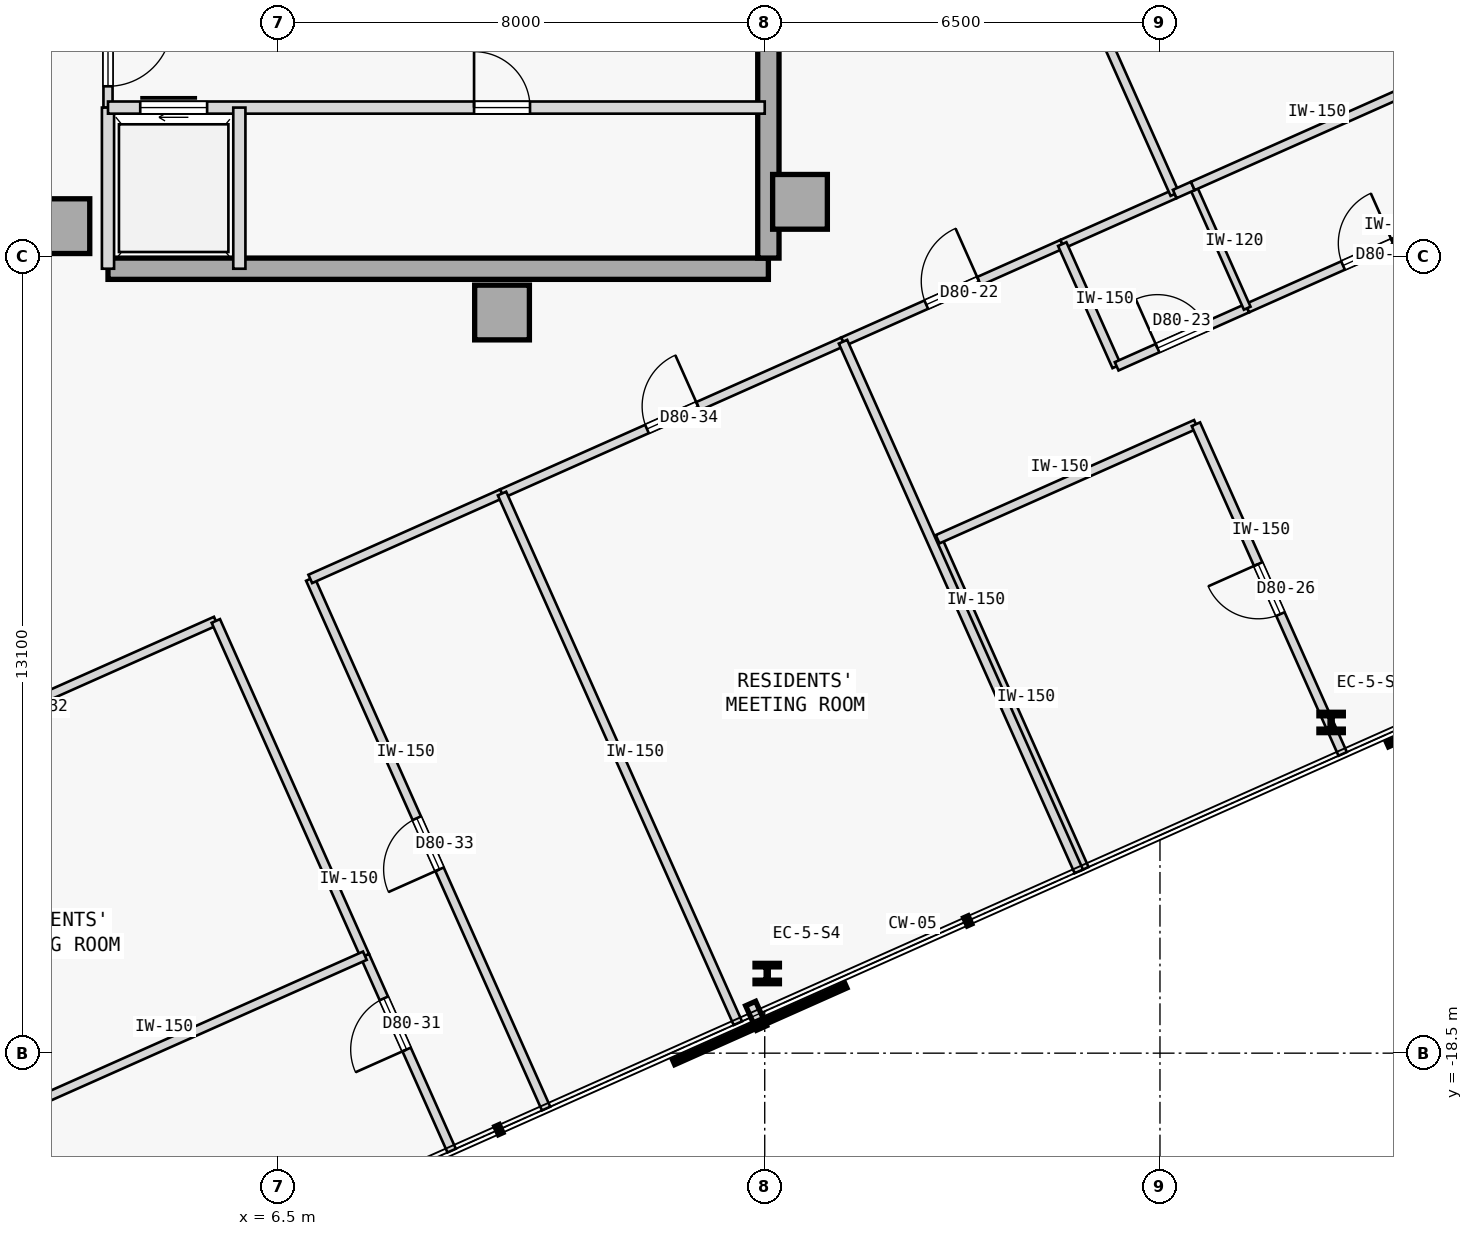
"""IFC4 building model, lengths in metres.
Left out: names, types, materials, properties, quantities, classifications, styles, units other than length and angle.
Written with IfcOpenShell. Run it as: python <this file> out.ifc"""

import sys

from ifc_helpers import new_model, si_unit, direction, frame, frame_2d, origin, origin_2d, place, context, subcontext, project, spatial, rectangle, i_section, extrude, element, fill, save


model = new_model("IFC4")
c1 = context("Model", 3, precision=1e-05, world=origin(), true_north=direction((0.0, 1.0)))
c2 = subcontext(c1, "Body", "Model", "MODEL_VIEW")
j1 = project(units=[si_unit("LENGTHUNIT", "METRE"), si_unit("PLANEANGLEUNIT", "RADIAN")], contexts=[c1])
p1 = place(None, origin())
s1 = spatial("IfcSite", under=j1, at=p1, CompositionType="ELEMENT")
p2 = place(p1, origin())
s2 = spatial("IfcBuilding", under=s1, at=p2, CompositionType="ELEMENT")
p3 = place(p2, frame((0.0, 0.0, 298.65)))
s3 = spatial("IfcBuildingStorey", under=s2, at=p3, CompositionType="ELEMENT", Elevation=298.65)
for number, where, z_axis, x_axis in (
    (1, (15.08, -4.5, 0.0), (0.0, 0.0, 1.0), (1.0, 0.0, 0.0)),
    (2, (10.18, -6.32, 0.0), (0.0, 0.0, 1.0), (1.0, 0.0, 0.0)),
    (3, (2.95, -4.9, 0.0), (0.0, 0.0, 1.0), (1.0, 0.0, 0.0)),
):
    element("IfcColumn", number, at=place(p3, frame(where, z_axis=z_axis, x_axis=x_axis)), inside=s3, PredefinedType="COLUMN", context=c2, shape_type="SweptSolid", body=[
        extrude(rectangle(XDim=0.9, YDim=0.9, at=origin_2d()), origin(), (0.0, 0.0, 1.0), 3.35),
    ])
p4 = place(p3, frame((3.7, -5.6, 0.0), z_axis=(0.0, 0.0, 1.0), x_axis=(1.0, 0.0, 0.0)))
e4 = element("IfcWall", 4, at=p4, inside=s3, PredefinedType="SHEAR", context=c2, shape_type="SweptSolid", body=[
    extrude(rectangle(XDim=10.86, YDim=0.35, at=frame_2d((5.43, 0.0))), origin(), (0.0, 0.0, 1.0), 3.125),
])
p5 = place(p3, frame((14.56, -5.425, 0.0), z_axis=(0.0, 0.0, 1.0), x_axis=(0.0, 1.0, 0.0)))
e5 = element("IfcWall", 5, at=p5, inside=s3, PredefinedType="SHEAR", context=c2, shape_type="SweptSolid", body=[
    extrude(rectangle(XDim=10.85, YDim=0.35, at=frame_2d((5.425, 0.0))), origin(), (0.0, 0.0, 1.0), 3.125),
])
for number, where, z_axis, x_axis in (
    (6, (14.541, -17.19, 0.0), (0.0, 0.0, 1.0), (1.0, 0.0, 0.0)),
    (7, (23.814, -13.062, 0.0), (0.0, 0.0, 1.0), (1.0, 0.0, 0.0)),
):
    element("IfcColumn", number, at=place(p3, frame(where, z_axis=z_axis, x_axis=x_axis)), inside=s3, PredefinedType="COLUMN", context=c2, shape_type="SweptSolid", body=[
        extrude(i_section(OverallWidth=0.401, OverallDepth=0.335, WebThickness=0.036, FlangeThickness=0.058, FilletRadius=0.015, at=origin_2d()), origin(), (0.0, 0.0, 1.0), 3.35),
    ])
p6 = place(p3, frame((3.7, -2.95, 0.0), z_axis=(0.0, 0.0, 1.0), x_axis=(0.0, 1.0, 0.0)))
e8 = element("IfcWall", 8, at=p6, inside=s3, PredefinedType="PARTITIONING", context=c2, shape_type="SweptSolid", body=[
    extrude(rectangle(XDim=1.8, YDim=0.15, at=frame_2d((0.9, 0.0))), origin(), (0.0, 0.0, 1.0), 3.125),
])
p7 = place(p6, frame((0.35, 0.0, 0.0)))
e9 = element("IfcOpeningElement", 9, at=p7, cuts=e8, PredefinedType="OPENING", context=c2, shape_type="SweptSolid", body=[
    extrude(rectangle(XDim=1.05, YDim=2.18, at=frame_2d((0.525, 1.09))), frame((0.0, 0.085, 0.0), z_axis=(0.0, -1.0, 0.0), x_axis=(1.0, 0.0, 0.0)), (0.0, 0.0, 1.0), 0.17),
])
p8 = place(p3, frame((3.7, -5.6, 0.0), z_axis=(0.0, 0.0, 1.0), x_axis=(0.0, 1.0, 0.0)))
e10 = element("IfcWall", 10, at=p8, inside=s3, PredefinedType="STANDARD", context=c2, shape_type="SweptSolid", body=[
    extrude(rectangle(XDim=2.65, YDim=0.2, at=frame_2d((1.325, 0.0))), origin(), (0.0, 0.0, 1.0), 3.125),
])
p9 = place(p3, frame((3.7, -2.95, 0.0), z_axis=(0.0, 0.0, 1.0), x_axis=(1.0, 0.0, 0.0)))
e11 = element("IfcWall", 11, at=p9, inside=s3, PredefinedType="STANDARD", context=c2, shape_type="SweptSolid", body=[
    extrude(rectangle(XDim=10.8, YDim=0.2, at=frame_2d((5.4, 0.0))), origin(), (0.0, 0.0, 1.0), 3.125),
])
p10 = place(p9, frame((0.53, 0.0, 0.0)))
e12 = element("IfcOpeningElement", 12, at=p10, cuts=e11, PredefinedType="OPENING", context=c2, shape_type="SweptSolid", body=[
    extrude(rectangle(XDim=1.1, YDim=2.15, at=frame_2d((0.55, 1.075))), frame((0.0, 0.11, 0.0), z_axis=(0.0, -1.0, 0.0), x_axis=(1.0, 0.0, 0.0)), (0.0, 0.0, 1.0), 0.22),
])
p11 = place(p9, frame((6.02, 0.0, 0.0)))
e13 = element("IfcOpeningElement", 13, at=p11, cuts=e11, PredefinedType="OPENING", context=c2, shape_type="SweptSolid", body=[
    extrude(rectangle(XDim=0.92, YDim=2.15, at=frame_2d((0.46, 1.075))), frame((0.0, 0.11, 0.0), z_axis=(0.0, -1.0, 0.0), x_axis=(1.0, 0.0, 0.0)), (0.0, 0.0, 1.0), 0.22),
])
p12 = place(p3, frame((5.86, -5.6, 0.0), z_axis=(0.0, 0.0, 1.0), x_axis=(0.0, 1.0, 0.0)))
e14 = element("IfcWall", 14, at=p12, inside=s3, PredefinedType="STANDARD", context=c2, shape_type="SweptSolid", body=[
    extrude(rectangle(XDim=2.65, YDim=0.2, at=frame_2d((1.325, 0.0))), origin(), (0.0, 0.0, 1.0), 3.125),
])
p13 = place(p3, frame((15.787, -6.8, 0.0), z_axis=(0.0, 0.0, 1.0), x_axis=(0.913558844356, 0.406706574693, 0.0)))
e15 = element("IfcWall", 15, at=p13, inside=s3, PredefinedType="PARTITIONING", context=c2, shape_type="SweptSolid", body=[
    extrude(rectangle(XDim=3.947, YDim=0.15, at=frame_2d((1.973, 0.0))), origin(), (0.0, 0.0, 1.0), 3.125),
])
p14 = place(p13, frame((1.499, 0.0, 0.0)))
e16 = element("IfcOpeningElement", 16, at=p14, cuts=e15, PredefinedType="OPENING", context=c2, shape_type="SweptSolid", body=[
    extrude(rectangle(XDim=0.95, YDim=2.15, at=frame_2d((0.475, 1.075))), frame((0.0, 0.085, 0.0), z_axis=(0.0, -1.0, 0.0), x_axis=(1.0, 0.0, 0.0)), (0.0, 0.0, 1.0), 0.17),
])
p15 = place(p3, frame((19.393, -5.195, 0.0), z_axis=(0.0, 0.0, 1.0), x_axis=(0.91354290336, 0.406742380039, 0.0)))
e17 = element("IfcWall", 17, at=p15, inside=s3, PredefinedType="PARTITIONING", context=c2, shape_type="SweptSolid", body=[
    extrude(rectangle(XDim=2.025, YDim=0.15, at=frame_2d((1.013, 0.0))), origin(), (0.0, 0.0, 1.0), 3.125),
])
p16 = place(p3, frame((9.352, -20.103, 0.0), z_axis=(0.0, 0.0, 1.0), x_axis=(-0.406745199814, 0.913541647889, 0.0)))
e18 = element("IfcWall", 18, at=p16, inside=s3, PredefinedType="PARTITIONING", context=c2, shape_type="SweptSolid", body=[
    extrude(rectangle(XDim=3.509, YDim=0.15, at=frame_2d((1.754, 0.0))), origin(), (0.0, 0.0, 1.0), 3.125),
])
p17 = place(p16, frame((1.821, 0.0, 0.0)))
e19 = element("IfcOpeningElement", 19, at=p17, cuts=e18, PredefinedType="OPENING", context=c2, shape_type="SweptSolid", body=[
    extrude(rectangle(XDim=0.92, YDim=2.15, at=frame_2d((0.46, 1.075))), frame((0.0, 0.085, 0.0), z_axis=(0.0, -1.0, 0.0), x_axis=(1.0, 0.0, 0.0)), (0.0, 0.0, 1.0), 0.17),
])
p18 = place(p3, frame((-0.903, -14.231, 0.0), z_axis=(0.0, 0.0, 1.0), x_axis=(0.913538735702, 0.406751740466, 0.0)))
e20 = element("IfcWall", 20, at=p18, inside=s3, PredefinedType="PARTITIONING", context=c2, shape_type="SweptSolid", body=[
    extrude(rectangle(XDim=6.98, YDim=0.15, at=frame_2d((3.49, 0.0))), origin(), (0.0, 0.0, 1.0), 3.125),
])
p19 = place(p18, frame((3.03, 0.0, 0.0)))
e21 = element("IfcOpeningElement", 21, at=p19, cuts=e20, PredefinedType="OPENING", context=c2, shape_type="SweptSolid", body=[
    extrude(rectangle(XDim=0.92, YDim=2.15, at=frame_2d((0.46, 1.075))), frame((0.0, 0.085, 0.0), z_axis=(0.0, -1.0, 0.0), x_axis=(1.0, 0.0, 0.0)), (0.0, 0.0, 1.0), 0.17),
])
p20 = place(p3, frame((7.924, -16.897, 0.0), z_axis=(0.0, 0.0, 1.0), x_axis=(-0.406754846047, 0.91353735294, 0.0)))
e22 = element("IfcWall", 22, at=p20, inside=s3, PredefinedType="PARTITIONING", context=c2, shape_type="SweptSolid", body=[
    extrude(rectangle(XDim=6.026, YDim=0.15, at=frame_2d((3.013, 0.0))), origin(), (0.0, 0.0, 1.0), 3.125),
])
p21 = place(p3, frame((10.905, -19.412, 0.0), z_axis=(0.0, 0.0, 1.0), x_axis=(-0.406729927653, 0.913548447512, 0.0)))
e23 = element("IfcWall", 23, at=p21, inside=s3, PredefinedType="PARTITIONING", context=c2, shape_type="SweptSolid", body=[
    extrude(rectangle(XDim=9.535, YDim=0.15, at=frame_2d((4.768, 0.0))), origin(), (0.0, 0.0, 1.0), 3.125),
])
p22 = place(p21, frame((4.308, 0.0, 0.0)))
e24 = element("IfcOpeningElement", 24, at=p22, cuts=e23, PredefinedType="OPENING", context=c2, shape_type="SweptSolid", body=[
    extrude(rectangle(XDim=0.92, YDim=2.15, at=frame_2d((0.46, 1.075))), frame((0.0, 0.085, 0.0), z_axis=(0.0, -1.0, 0.0), x_axis=(1.0, 0.0, 0.0)), (0.0, 0.0, 1.0), 0.17),
])
p23 = place(p3, frame((7.026, -10.701, 0.0), z_axis=(0.0, 0.0, 1.0), x_axis=(0.913534253733, 0.406761806536, 0.0)))
e25 = element("IfcWall", 25, at=p23, inside=s3, PredefinedType="PARTITIONING", context=c2, shape_type="SweptSolid", body=[
    extrude(rectangle(XDim=3.452, YDim=0.15, at=frame_2d((1.726, 0.0))), origin(), (0.0, 0.0, 1.0), 3.125),
])
p24 = place(p3, frame((10.18, -9.297, 0.0), z_axis=(0.0, 0.0, 1.0), x_axis=(0.913545641557, 0.406736229997, 0.0)))
e26 = element("IfcWall", 26, at=p24, inside=s3, PredefinedType="PARTITIONING", context=c2, shape_type="SweptSolid", body=[
    extrude(rectangle(XDim=6.138, YDim=0.15, at=frame_2d((3.069, 0.0))), origin(), (0.0, 0.0, 1.0), 3.125),
])
p25 = place(p24, frame((2.609, 0.0, 0.0)))
e27 = element("IfcOpeningElement", 27, at=p25, cuts=e26, PredefinedType="OPENING", context=c2, shape_type="SweptSolid", body=[
    extrude(rectangle(XDim=0.92, YDim=2.15, at=frame_2d((0.46, 1.075))), frame((0.0, 0.085, 0.0), z_axis=(0.0, -1.0, 0.0), x_axis=(1.0, 0.0, 0.0)), (0.0, 0.0, 1.0), 0.17),
])
p26 = place(p3, frame((21.243, -4.371, 0.0), z_axis=(0.0, 0.0, 1.0), x_axis=(-0.406751025101, 0.913539054217, 0.0)))
e28 = element("IfcWall", 28, at=p26, inside=s3, PredefinedType="PARTITIONING", context=c2, shape_type="SweptSolid", body=[
    extrude(rectangle(XDim=8.615, YDim=0.15, at=frame_2d((4.308, 0.0))), origin(), (0.0, 0.0, 1.0), 3.125),
])
p27 = place(p26, frame((3.847, 0.0, 0.0)))
e29 = element("IfcOpeningElement", 29, at=p27, cuts=e28, PredefinedType="OPENING", context=c2, shape_type="SweptSolid", body=[
    extrude(rectangle(XDim=0.92, YDim=2.15, at=frame_2d((0.46, 1.075))), frame((0.0, 0.085, 0.0), z_axis=(0.0, -1.0, 0.0), x_axis=(1.0, 0.0, 0.0)), (0.0, 0.0, 1.0), 0.17),
])
p28 = place(p3, frame((2.884, -22.983, 0.0), z_axis=(0.0, 0.0, 1.0), x_axis=(-0.406733763825, 0.913546739562, 0.0)))
e30 = element("IfcWall", 30, at=p28, inside=s3, PredefinedType="PARTITIONING", context=c2, shape_type="SweptSolid", body=[
    extrude(rectangle(XDim=5.935, YDim=0.15, at=frame_2d((2.968, 0.0))), origin(), (0.0, 0.0, 1.0), 3.125),
])
p29 = place(p3, frame((2.975, -22.942, 0.0), z_axis=(0.0, 0.0, 1.0), x_axis=(-0.406745199814, 0.913541647889, 0.0)))
e31 = element("IfcWall", 31, at=p29, inside=s3, PredefinedType="PARTITIONING", context=c2, shape_type="SweptSolid", body=[
    extrude(rectangle(XDim=3.509, YDim=0.15, at=frame_2d((1.754, 0.0))), origin(), (0.0, 0.0, 1.0), 3.125),
])
p30 = place(p3, frame((20.288, -7.205, 0.0), z_axis=(0.0, 0.0, 1.0), x_axis=(-0.406817905151, 0.913509273105, 0.0)))
e32 = element("IfcWall", 32, at=p30, inside=s3, PredefinedType="PARTITIONING", context=c2, shape_type="SweptSolid", body=[
    extrude(rectangle(XDim=2.2, YDim=0.15, at=frame_2d((1.1, 0.0))), origin(), (0.0, 0.0, 1.0), 3.125),
])
p31 = place(p3, frame((20.288, -7.205, 0.0), z_axis=(0.0, 0.0, 1.0), x_axis=(0.913541436194, 0.406745675276, 0.0)))
e33 = element("IfcWall", 33, at=p31, inside=s3, PredefinedType="PARTITIONING", context=c2, shape_type="SweptSolid", body=[
    extrude(rectangle(XDim=2.35, YDim=0.15, at=frame_2d((1.175, 0.0))), origin(), (0.0, 0.0, 1.0), 3.125),
])
p32 = place(p31, frame((0.735, 0.0, 0.0)))
e34 = element("IfcOpeningElement", 34, at=p32, cuts=e33, PredefinedType="OPENING", context=c2, shape_type="SweptSolid", body=[
    extrude(rectangle(XDim=0.88, YDim=2.15, at=frame_2d((0.44, 1.075))), frame((0.0, 0.085, 0.0), z_axis=(0.0, -1.0, 0.0), x_axis=(1.0, 0.0, 0.0)), (0.0, 0.0, 1.0), 0.17),
])
p33 = place(p3, frame((22.435, -6.249, 0.0), z_axis=(0.0, 0.0, 1.0), x_axis=(0.913545193015, 0.406737237438, 0.0)))
e35 = element("IfcWall", 35, at=p33, inside=s3, PredefinedType="PARTITIONING", context=c2, shape_type="SweptSolid", body=[
    extrude(rectangle(XDim=4.35, YDim=0.15, at=frame_2d((2.175, 0.0))), origin(), (0.0, 0.0, 1.0), 3.125),
])
p34 = place(p33, frame((1.725, 0.0, 0.0)))
e36 = element("IfcOpeningElement", 36, at=p34, cuts=e35, PredefinedType="OPENING", context=c2, shape_type="SweptSolid", body=[
    extrude(rectangle(XDim=0.9, YDim=2.15, at=frame_2d((0.45, 1.075))), frame((0.0, 0.085, 0.0), z_axis=(0.0, -1.0, 0.0), x_axis=(1.0, 0.0, 0.0)), (0.0, 0.0, 1.0), 0.17),
])
p35 = place(p3, frame((19.757, -15.47, 0.0), z_axis=(0.0, 0.0, 1.0), x_axis=(-0.406749048544, 0.913539934271, 0.0)))
e37 = element("IfcWall", 37, at=p35, inside=s3, PredefinedType="PARTITIONING", context=c2, shape_type="SweptSolid", body=[
    extrude(rectangle(XDim=5.935, YDim=0.15, at=frame_2d((2.968, 0.0))), origin(), (0.0, 0.0, 1.0), 3.125),
])
p36 = place(p3, frame((17.343, -10.049, 0.0), z_axis=(0.0, 0.0, 1.0), x_axis=(0.913525541207, 0.406781373176, 0.0)))
e38 = element("IfcWall", 38, at=p36, inside=s3, PredefinedType="PARTITIONING", context=c2, shape_type="SweptSolid", body=[
    extrude(rectangle(XDim=4.65, YDim=0.15, at=frame_2d((2.325, 0.0))), origin(), (0.0, 0.0, 1.0), 3.125),
])
p37 = place(p3, frame((24.005, -13.579, 0.0), z_axis=(0.0, 0.0, 1.0), x_axis=(-0.406733763825, 0.913546739562, 0.0)))
e39 = element("IfcWall", 39, at=p37, inside=s3, PredefinedType="PARTITIONING", context=c2, shape_type="SweptSolid", body=[
    extrude(rectangle(XDim=5.935, YDim=0.15, at=frame_2d((2.968, 0.0))), origin(), (0.0, 0.0, 1.0), 3.125),
])
p38 = place(p37, frame((2.518, 0.0, 0.0)))
e40 = element("IfcOpeningElement", 40, at=p38, cuts=e39, PredefinedType="OPENING", context=c2, shape_type="SweptSolid", body=[
    extrude(rectangle(XDim=0.9, YDim=2.15, at=frame_2d((0.45, 1.075))), frame((0.0, 0.085, 0.0), z_axis=(0.0, -1.0, 0.0), x_axis=(1.0, 0.0, 0.0)), (0.0, 0.0, 1.0), 0.17),
])
p39 = place(p3, frame((19.665, -15.511, 0.0), z_axis=(0.0, 0.0, 1.0), x_axis=(-0.406729927653, 0.913548447512, 0.0)))
e41 = element("IfcWall", 41, at=p39, inside=s3, PredefinedType="PARTITIONING", context=c2, shape_type="SweptSolid", body=[
    extrude(rectangle(XDim=9.535, YDim=0.15, at=frame_2d((4.768, 0.0))), origin(), (0.0, 0.0, 1.0), 3.125),
])
p40 = place(p3, frame((22.435, -6.249, 0.0), z_axis=(0.0, 0.0, 1.0), x_axis=(-0.406725294076, 0.913550510459, 0.0)))
e42 = element("IfcWall", 42, at=p40, inside=s3, PredefinedType="PARTITIONING", context=c2, shape_type="SweptSolid", body=[
    extrude(rectangle(XDim=2.2, YDim=0.12, at=frame_2d((1.1, 0.0))), origin(), (0.0, 0.0, 1.0), 3.125),
])
p41 = place(p3, frame((21.243, -4.371, 0.0), z_axis=(0.0, 0.0, 1.0), x_axis=(0.913656562077, 0.406487006648, 0.0)))
e43 = element("IfcWall", 43, at=p41, inside=s3, PredefinedType="PARTITIONING", context=c2, shape_type="SweptSolid", body=[
    extrude(rectangle(XDim=0.325, YDim=0.15, at=frame_2d((0.163, 0.0))), origin(), (0.0, 0.0, 1.0), 3.125),
])
p42 = place(p3, frame((21.54, -4.239, 0.0), z_axis=(0.0, 0.0, 1.0), x_axis=(0.913545193015, 0.406737237438, 0.0)))
e44 = element("IfcWall", 44, at=p42, inside=s3, PredefinedType="PARTITIONING", context=c2, shape_type="SweptSolid", body=[
    extrude(rectangle(XDim=4.35, YDim=0.15, at=frame_2d((2.175, 0.0))), origin(), (0.0, 0.0, 1.0), 3.125),
])
p43 = place(p3, frame((1.548, -19.737, 0.0), z_axis=(0.0, 0.0, 1.0), x_axis=(0.913544522324, 0.40673874383, 0.0)))
e45 = element("IfcWall", 45, at=p43, inside=s3, PredefinedType="PARTITIONING", context=c2, shape_type="SweptSolid", body=[
    extrude(rectangle(XDim=6.98, YDim=0.15, at=frame_2d((3.49, 0.0))), origin(), (0.0, 0.0, 1.0), 3.125),
])
p44 = place(p3, frame((14.058, -18.008, 0.0), z_axis=(0.0, 0.0, 1.0), x_axis=(-0.406751296215, 0.913538933504, 0.0)))
e46 = element("IfcWall", 46, at=p44, inside=s3, PredefinedType="PARTITIONING", context=c2, shape_type="SweptSolid", body=[
    extrude(rectangle(XDim=9.535, YDim=0.15, at=frame_2d((4.768, 0.0))), origin(), (0.0, 0.0, 1.0), 3.125),
])
p45 = place(p7, frame((1.05, 0.0, 0.0), z_axis=(0.0, 0.0, 1.0), x_axis=(-1.0, 0.0, 0.0)))
e47 = element("IfcDoor", 47, at=p45, inside=s3, OperationType="SINGLE_SWING_RIGHT", PredefinedType="DOOR", context=c2, shape_type="SweptSolid", body=[
    extrude(rectangle(XDim=1.05, YDim=2.18, at=frame_2d((0.525, 1.09))), frame((0.0, 0.025, 0.0), z_axis=(0.0, -1.0, 0.0), x_axis=(1.0, 0.0, 0.0)), (0.0, 0.0, 1.0), 0.05),
])
fill(e9, e47)
p46 = place(p10, origin())
e48 = element("IfcDoor", 48, at=p46, inside=s3, OperationType="SLIDING_TO_RIGHT", PredefinedType="DOOR", context=c2, shape_type="SweptSolid", body=[
    extrude(rectangle(XDim=1.1, YDim=2.15, at=frame_2d((0.55, 1.075))), frame((0.0, 0.025, 0.0), z_axis=(0.0, -1.0, 0.0), x_axis=(1.0, 0.0, 0.0)), (0.0, 0.0, 1.0), 0.05),
])
fill(e12, e48)
p47 = place(p11, origin())
e49 = element("IfcDoor", 49, at=p47, inside=s3, OperationType="SINGLE_SWING_LEFT", PredefinedType="DOOR", context=c2, shape_type="SweptSolid", body=[
    extrude(rectangle(XDim=0.92, YDim=2.15, at=frame_2d((0.46, 1.075))), frame((0.0, 0.025, 0.0), z_axis=(0.0, -1.0, 0.0), x_axis=(1.0, 0.0, 0.0)), (0.0, 0.0, 1.0), 0.05),
])
fill(e13, e49)
p48 = place(p14, origin())
e50 = element("IfcDoor", 50, at=p48, inside=s3, OperationType="SINGLE_SWING_RIGHT", PredefinedType="DOOR", context=c2, shape_type="SweptSolid", body=[
    extrude(rectangle(XDim=0.95, YDim=2.15, at=frame_2d((0.475, 1.075))), frame((0.0, 0.025, 0.0), z_axis=(0.0, -1.0, 0.0), x_axis=(1.0, 0.0, 0.0)), (0.0, 0.0, 1.0), 0.05),
])
fill(e16, e50)
p49 = place(p32, origin())
e51 = element("IfcDoor", 51, at=p49, inside=s3, OperationType="SINGLE_SWING_LEFT", PredefinedType="DOOR", context=c2, shape_type="SweptSolid", body=[
    extrude(rectangle(XDim=0.88, YDim=2.15, at=frame_2d((0.44, 1.075))), frame((0.0, 0.025, 0.0), z_axis=(0.0, -1.0, 0.0), x_axis=(1.0, 0.0, 0.0)), (0.0, 0.0, 1.0), 0.05),
])
fill(e34, e51)
p50 = place(p34, origin())
e52 = element("IfcDoor", 52, at=p50, inside=s3, OperationType="SINGLE_SWING_RIGHT", PredefinedType="DOOR", context=c2, shape_type="SweptSolid", body=[
    extrude(rectangle(XDim=0.9, YDim=2.15, at=frame_2d((0.45, 1.075))), frame((0.0, 0.025, 0.0), z_axis=(0.0, -1.0, 0.0), x_axis=(1.0, 0.0, 0.0)), (0.0, 0.0, 1.0), 0.05),
])
fill(e36, e52)
p51 = place(p38, origin())
e53 = element("IfcDoor", 53, at=p51, inside=s3, OperationType="SINGLE_SWING_RIGHT", PredefinedType="DOOR", context=c2, shape_type="SweptSolid", body=[
    extrude(rectangle(XDim=0.9, YDim=2.15, at=frame_2d((0.45, 1.075))), frame((0.0, 0.025, 0.0), z_axis=(0.0, -1.0, 0.0), x_axis=(1.0, 0.0, 0.0)), (0.0, 0.0, 1.0), 0.05),
])
fill(e40, e53)
p52 = place(p17, origin())
e54 = element("IfcDoor", 54, at=p52, inside=s3, OperationType="SINGLE_SWING_LEFT", PredefinedType="DOOR", context=c2, shape_type="SweptSolid", body=[
    extrude(rectangle(XDim=0.92, YDim=2.15, at=frame_2d((0.46, 1.075))), frame((0.0, 0.025, 0.0), z_axis=(0.0, -1.0, 0.0), x_axis=(1.0, 0.0, 0.0)), (0.0, 0.0, 1.0), 0.05),
])
fill(e19, e54)
p53 = place(p22, origin())
e55 = element("IfcDoor", 55, at=p53, inside=s3, OperationType="SINGLE_SWING_LEFT", PredefinedType="DOOR", context=c2, shape_type="SweptSolid", body=[
    extrude(rectangle(XDim=0.92, YDim=2.15, at=frame_2d((0.46, 1.075))), frame((0.0, 0.025, 0.0), z_axis=(0.0, -1.0, 0.0), x_axis=(1.0, 0.0, 0.0)), (0.0, 0.0, 1.0), 0.05),
])
fill(e24, e55)
p54 = place(p25, origin())
e56 = element("IfcDoor", 56, at=p54, inside=s3, OperationType="SINGLE_SWING_RIGHT", PredefinedType="DOOR", context=c2, shape_type="SweptSolid", body=[
    extrude(rectangle(XDim=0.92, YDim=2.15, at=frame_2d((0.46, 1.075))), frame((0.0, 0.025, 0.0), z_axis=(0.0, -1.0, 0.0), x_axis=(1.0, 0.0, 0.0)), (0.0, 0.0, 1.0), 0.05),
])
fill(e27, e56)
save(model, sys.argv[1])
